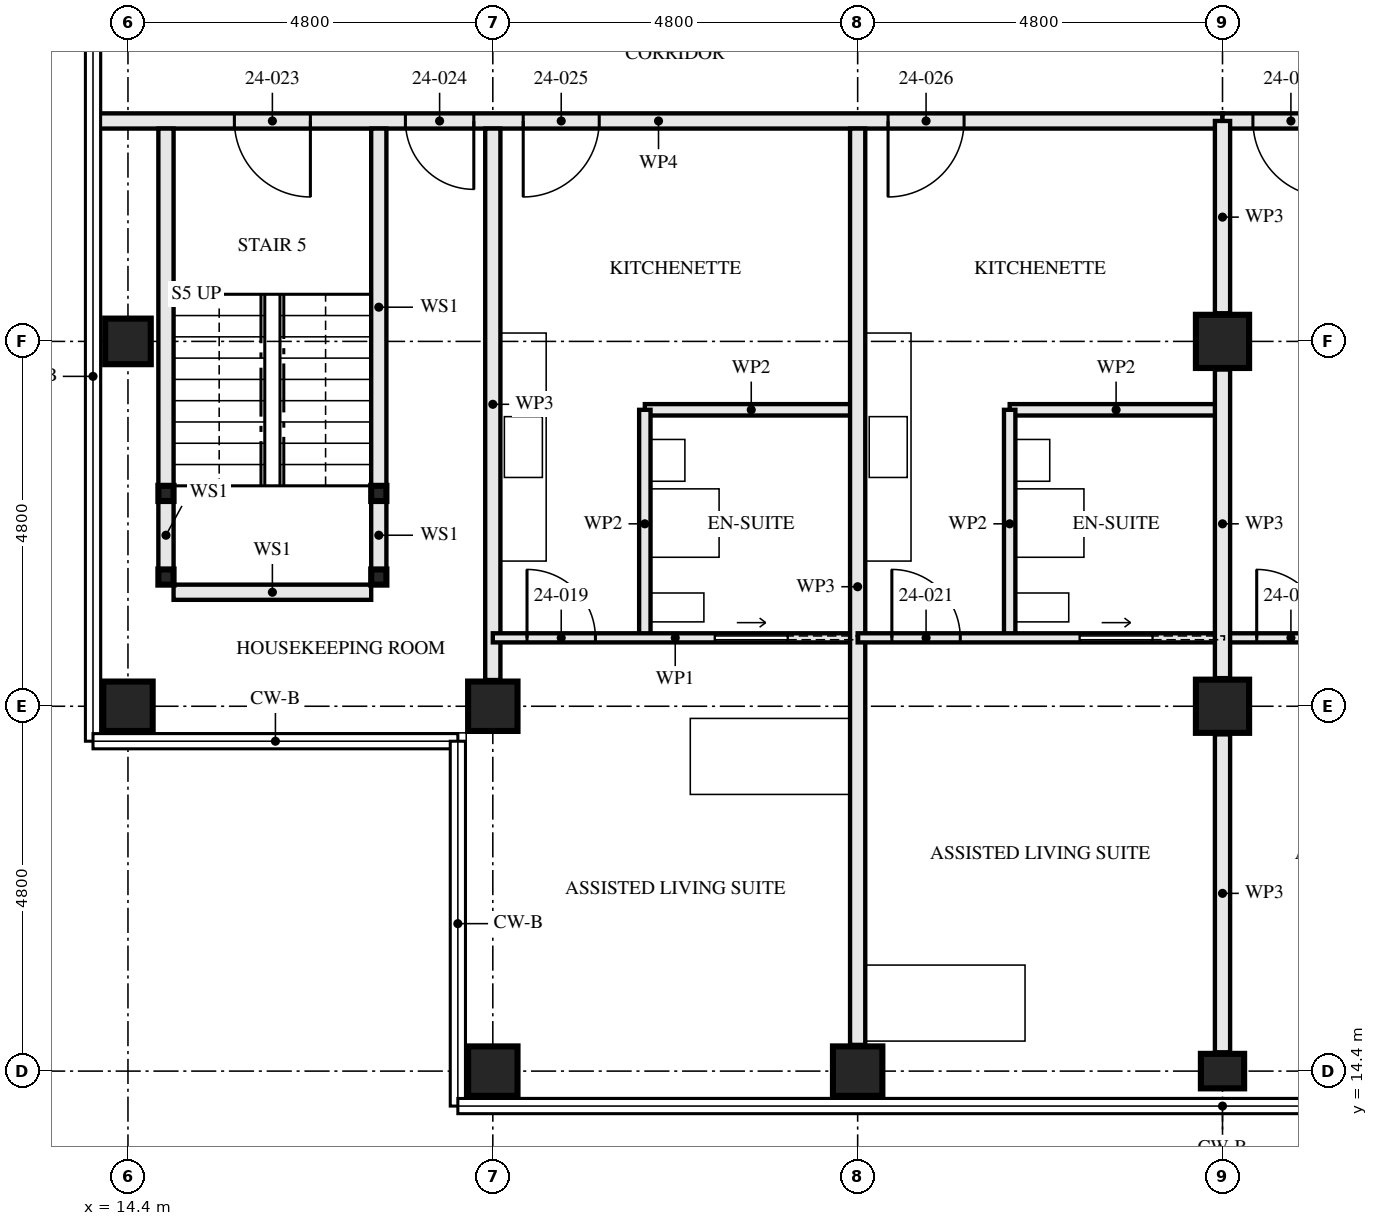
"""IFC4 building model, lengths in metres.
Left out: names, types, materials, properties, quantities, classifications, styles, units other than length and angle.
Written with IfcOpenShell. Run it as: python <this file> out.ifc"""

import sys

from ifc_helpers import new_model, si_unit, direction, frame, frame_2d, origin, origin_2d, place, context, subcontext, project, spatial, rectangle, hollow_rectangle, i_section, extrude, element, fill, save


model = new_model("IFC4")
c1 = context("Model", 3, precision=1e-05, world=origin(), true_north=direction((0.0, 1.0)))
c2 = subcontext(c1, "Body", "Model", "MODEL_VIEW")
j1 = project(units=[si_unit("LENGTHUNIT", "METRE"), si_unit("PLANEANGLEUNIT", "RADIAN")], contexts=[c1])
p1 = place(None, origin())
s1 = spatial("IfcSite", under=j1, at=p1, CompositionType="ELEMENT")
p2 = place(p1, origin())
s2 = spatial("IfcBuilding", under=s1, at=p2, CompositionType="ELEMENT")
p3 = place(p2, frame((0.0, 0.0, 91.0)))
s3 = spatial("IfcBuildingStorey", under=s2, at=p3, CompositionType="ELEMENT", Elevation=91.0)
p4 = place(p3, frame((14.4, 19.2, 0.0), z_axis=(0.0, 0.0, 1.0), x_axis=(0.0, 1.0, 0.0)))
e1 = element("IfcColumn", 1, at=p4, inside=s3, PredefinedType="COLUMN", context=c2, shape_type="SweptSolid", body=[
    extrude(hollow_rectangle(XDim=0.65, YDim=0.65, WallThickness=0.08, at=origin_2d()), origin(), (0.0, 0.0, 1.0), 3.5),
])
p5 = place(p3, frame((14.4, 24.0, 0.0), z_axis=(0.0, 0.0, 1.0), x_axis=(1.0, 0.0, 0.0)))
e2 = element("IfcColumn", 2, at=p5, inside=s3, PredefinedType="COLUMN", context=c2, shape_type="SweptSolid", body=[
    extrude(hollow_rectangle(XDim=0.6, YDim=0.6, WallThickness=0.08, at=origin_2d()), origin(), (0.0, 0.0, 1.0), 3.5),
])
for number, where, z_axis, x_axis in (
    (3, (19.2, 14.4, 0.0), (0.0, 0.0, 1.0), (0.0, 1.0, 0.0)),
    (4, (19.2, 19.2, 0.0), (0.0, 0.0, 1.0), (0.0, 1.0, 0.0)),
    (5, (24.0, 14.4, 0.0), (0.0, 0.0, 1.0), (0.0, 1.0, 0.0)),
):
    element("IfcColumn", number, at=place(p3, frame(where, z_axis=z_axis, x_axis=x_axis)), inside=s3, PredefinedType="COLUMN", context=c2, shape_type="SweptSolid", body=[
        extrude(hollow_rectangle(XDim=0.65, YDim=0.65, WallThickness=0.08, at=origin_2d()), origin(), (0.0, 0.0, 1.0), 3.5),
    ])
p6 = place(p3, frame((28.8, 14.4, 0.0), z_axis=(0.0, 0.0, 1.0), x_axis=(0.0, 1.0, 0.0)))
e6 = element("IfcColumn", 6, at=p6, inside=s3, PredefinedType="COLUMN", context=c2, shape_type="SweptSolid", body=[
    extrude(i_section(OverallWidth=0.454, OverallDepth=0.569, WebThickness=0.078, FlangeThickness=0.125, FilletRadius=0.015, at=origin_2d()), origin(), (0.0, 0.0, 1.0), 3.5),
])
for number, where, z_axis, x_axis in (
    (7, (28.8, 19.2, 0.0), (0.0, 0.0, 1.0), (1.0, 0.0, 0.0)),
    (8, (28.8, 24.0, 0.0), (0.0, 0.0, 1.0), (1.0, 0.0, 0.0)),
):
    element("IfcColumn", number, at=place(p3, frame(where, z_axis=z_axis, x_axis=x_axis)), inside=s3, PredefinedType="COLUMN", context=c2, shape_type="SweptSolid", body=[
        extrude(hollow_rectangle(XDim=0.7, YDim=0.7, WallThickness=0.06, at=origin_2d()), origin(), (0.0, 0.0, 1.0), 3.5),
    ])
for number, where, z_axis, x_axis in (
    (9, (14.9, 20.9, 0.0), (0.0, 0.0, 1.0), (1.0, 0.0, 0.0)),
    (10, (17.7, 20.9, 0.0), (0.0, 0.0, 1.0), (1.0, 0.0, 0.0)),
    (11, (14.9, 22.0, 0.0), (0.0, 0.0, 1.0), (1.0, 0.0, 0.0)),
    (12, (17.7, 22.0, 0.0), (0.0, 0.0, 1.0), (1.0, 0.0, 0.0)),
):
    element("IfcColumn", number, at=place(p3, frame(where, z_axis=z_axis, x_axis=x_axis)), inside=s3, PredefinedType="COLUMN", context=c2, shape_type="SweptSolid", body=[
        extrude(hollow_rectangle(XDim=0.2, YDim=0.2, WallThickness=0.008, at=origin_2d()), origin(), (0.0, 0.0, 1.0), 3.33),
    ])
p7 = place(p3, frame((14.9, 21.0, 0.0), z_axis=(0.0, 0.0, 1.0), x_axis=(0.0, 1.0, 0.0)))
e13 = element("IfcWall", 13, at=p7, inside=s3, PredefinedType="SOLIDWALL", context=c2, shape_type="SweptSolid", body=[
    extrude(rectangle(XDim=0.9, YDim=0.2, at=frame_2d((0.45, 0.0))), origin(), (0.0, 0.0, 1.0), 2.99),
])
p8 = place(p3, frame((14.9, 22.1, 0.0), z_axis=(0.0, 0.0, 1.0), x_axis=(0.0, 1.0, 0.0)))
e14 = element("IfcWall", 14, at=p8, inside=s3, PredefinedType="SOLIDWALL", context=c2, shape_type="SweptSolid", body=[
    extrude(rectangle(XDim=4.7, YDim=0.2, at=frame_2d((2.35, 0.0))), origin(), (0.0, 0.0, 1.0), 2.99),
])
p9 = place(p3, frame((17.7, 21.0, 0.0), z_axis=(0.0, 0.0, 1.0), x_axis=(0.0, 1.0, 0.0)))
e15 = element("IfcWall", 15, at=p9, inside=s3, PredefinedType="SOLIDWALL", context=c2, shape_type="SweptSolid", body=[
    extrude(rectangle(XDim=0.9, YDim=0.2, at=frame_2d((0.45, 0.0))), origin(), (0.0, 0.0, 1.0), 2.99),
])
p10 = place(p3, frame((17.7, 22.1, 0.0), z_axis=(0.0, 0.0, 1.0), x_axis=(0.0, 1.0, 0.0)))
e16 = element("IfcWall", 16, at=p10, inside=s3, PredefinedType="SOLIDWALL", context=c2, shape_type="SweptSolid", body=[
    extrude(rectangle(XDim=4.7, YDim=0.2, at=frame_2d((2.35, 0.0))), origin(), (0.0, 0.0, 1.0), 2.99),
])
p11 = place(p3, frame((15.0, 20.7, 0.0), z_axis=(0.0, 0.0, 1.0), x_axis=(1.0, 0.0, 0.0)))
e17 = element("IfcWall", 17, at=p11, inside=s3, PredefinedType="SOLIDWALL", context=c2, shape_type="SweptSolid", body=[
    extrude(rectangle(XDim=2.6, YDim=0.2, at=frame_2d((1.3, 0.0))), origin(), (0.0, 0.0, 1.0), 3.33),
])
p12 = place(p3, frame((19.2, 19.545, 0.0), z_axis=(0.0, 0.0, 1.0), x_axis=(0.0, 1.0, 0.0)))
e18 = element("IfcWall", 18, at=p12, inside=s3, PredefinedType="PARTITIONING", context=c2, shape_type="SweptSolid", body=[
    extrude(rectangle(XDim=7.255, YDim=0.2, at=frame_2d((3.627, 0.0))), origin(), (0.0, 0.0, 1.0), 2.55),
])
p13 = place(p3, frame((21.2, 20.1, 0.0), z_axis=(0.0, 0.0, 1.0), x_axis=(0.0, 1.0, 0.0)))
e19 = element("IfcWall", 19, at=p13, inside=s3, PredefinedType="PARTITIONING", context=c2, shape_type="SweptSolid", body=[
    extrude(rectangle(XDim=3.0, YDim=0.15, at=frame_2d((1.5, 0.0))), origin(), (0.0, 0.0, 1.0), 3.33),
])
p14 = place(p3, frame((21.2, 23.1, 0.0), z_axis=(0.0, 0.0, 1.0), x_axis=(1.0, 0.0, 0.0)))
e20 = element("IfcWall", 20, at=p14, inside=s3, PredefinedType="PARTITIONING", context=c2, shape_type="SweptSolid", body=[
    extrude(rectangle(XDim=2.8, YDim=0.15, at=frame_2d((1.4, 0.0))), origin(), (0.0, 0.0, 1.0), 3.33),
])
p15 = place(p3, frame((19.2, 20.1, 0.0), z_axis=(0.0, 0.0, 1.0), x_axis=(1.0, 0.0, 0.0)))
e21 = element("IfcWall", 21, at=p15, inside=s3, PredefinedType="PARTITIONING", context=c2, shape_type="SweptSolid", body=[
    extrude(rectangle(XDim=4.8, YDim=0.12, at=frame_2d((2.4, 0.0))), origin(), (0.0, 0.0, 1.0), 3.33),
])
p16 = place(p15, frame((0.45, 0.0, 0.0)))
e22 = element("IfcOpeningElement", 22, at=p16, cuts=e21, PredefinedType="OPENING", context=c2, shape_type="SweptSolid", body=[
    extrude(rectangle(XDim=0.9, YDim=2.1, at=frame_2d((0.45, 1.05))), frame((0.0, 0.071, 0.0), z_axis=(0.0, -1.0, 0.0), x_axis=(1.0, 0.0, 0.0)), (0.0, 0.0, 1.0), 0.141),
])
p17 = place(p15, frame((2.925, 0.0, 0.0)))
e23 = element("IfcOpeningElement", 23, at=p17, cuts=e21, PredefinedType="OPENING", context=c2, shape_type="SweptSolid", body=[
    extrude(rectangle(XDim=0.95, YDim=2.1, at=frame_2d((0.475, 1.05))), frame((0.0, 0.071, 0.0), z_axis=(0.0, -1.0, 0.0), x_axis=(1.0, 0.0, 0.0)), (0.0, 0.0, 1.0), 0.141),
])
p18 = place(p3, frame((24.0, 14.745, 0.0), z_axis=(0.0, 0.0, 1.0), x_axis=(0.0, 1.0, 0.0)))
e24 = element("IfcWall", 24, at=p18, inside=s3, PredefinedType="PARTITIONING", context=c2, shape_type="SweptSolid", body=[
    extrude(rectangle(XDim=12.055, YDim=0.2, at=frame_2d((6.027, 0.0))), origin(), (0.0, 0.0, 1.0), 2.55),
])
p19 = place(p3, frame((26.0, 20.1, 0.0), z_axis=(0.0, 0.0, 1.0), x_axis=(0.0, 1.0, 0.0)))
e25 = element("IfcWall", 25, at=p19, inside=s3, PredefinedType="PARTITIONING", context=c2, shape_type="SweptSolid", body=[
    extrude(rectangle(XDim=3.0, YDim=0.15, at=frame_2d((1.5, 0.0))), origin(), (0.0, 0.0, 1.0), 3.33),
])
p20 = place(p3, frame((26.0, 23.1, 0.0), z_axis=(0.0, 0.0, 1.0), x_axis=(1.0, 0.0, 0.0)))
e26 = element("IfcWall", 26, at=p20, inside=s3, PredefinedType="PARTITIONING", context=c2, shape_type="SweptSolid", body=[
    extrude(rectangle(XDim=2.8, YDim=0.15, at=frame_2d((1.4, 0.0))), origin(), (0.0, 0.0, 1.0), 3.33),
])
p21 = place(p3, frame((24.0, 20.1, 0.0), z_axis=(0.0, 0.0, 1.0), x_axis=(1.0, 0.0, 0.0)))
e27 = element("IfcWall", 27, at=p21, inside=s3, PredefinedType="PARTITIONING", context=c2, shape_type="SweptSolid", body=[
    extrude(rectangle(XDim=4.8, YDim=0.12, at=frame_2d((2.4, 0.0))), origin(), (0.0, 0.0, 1.0), 3.33),
])
p22 = place(p21, frame((0.45, 0.0, 0.0)))
e28 = element("IfcOpeningElement", 28, at=p22, cuts=e27, PredefinedType="OPENING", context=c2, shape_type="SweptSolid", body=[
    extrude(rectangle(XDim=0.9, YDim=2.1, at=frame_2d((0.45, 1.05))), frame((0.0, 0.071, 0.0), z_axis=(0.0, -1.0, 0.0), x_axis=(1.0, 0.0, 0.0)), (0.0, 0.0, 1.0), 0.141),
])
p23 = place(p21, frame((2.925, 0.0, 0.0)))
e29 = element("IfcOpeningElement", 29, at=p23, cuts=e27, PredefinedType="OPENING", context=c2, shape_type="SweptSolid", body=[
    extrude(rectangle(XDim=0.95, YDim=2.1, at=frame_2d((0.475, 1.05))), frame((0.0, 0.071, 0.0), z_axis=(0.0, -1.0, 0.0), x_axis=(1.0, 0.0, 0.0)), (0.0, 0.0, 1.0), 0.141),
])
p24 = place(p3, frame((13.96, 26.9, 0.0), z_axis=(0.0, 0.0, 1.0), x_axis=(1.0, 0.0, 0.0)))
e30 = element("IfcWall", 30, at=p24, inside=s3, PredefinedType="PARTITIONING", context=c2, shape_type="SweptSolid", body=[
    extrude(rectangle(XDim=14.84, YDim=0.2, at=frame_2d((7.42, 0.0))), origin(), (0.0, 0.0, 1.0), 2.32),
])
p25 = place(p24, frame((1.84, 0.0, 0.0)))
e31 = element("IfcOpeningElement", 31, at=p25, cuts=e30, PredefinedType="OPENING", context=c2, shape_type="SweptSolid", body=[
    extrude(rectangle(XDim=1.0, YDim=2.1, at=frame_2d((0.5, 1.05))), frame((0.0, 0.111, 0.0), z_axis=(0.0, -1.0, 0.0), x_axis=(1.0, 0.0, 0.0)), (0.0, 0.0, 1.0), 0.221),
])
p26 = place(p24, frame((4.09, 0.0, 0.0)))
e32 = element("IfcOpeningElement", 32, at=p26, cuts=e30, PredefinedType="OPENING", context=c2, shape_type="SweptSolid", body=[
    extrude(rectangle(XDim=0.9, YDim=2.1, at=frame_2d((0.45, 1.05))), frame((0.0, 0.111, 0.0), z_axis=(0.0, -1.0, 0.0), x_axis=(1.0, 0.0, 0.0)), (0.0, 0.0, 1.0), 0.221),
])
p27 = place(p24, frame((5.64, 0.0, 0.0)))
e33 = element("IfcOpeningElement", 33, at=p27, cuts=e30, PredefinedType="OPENING", context=c2, shape_type="SweptSolid", body=[
    extrude(rectangle(XDim=1.0, YDim=2.1, at=frame_2d((0.5, 1.05))), frame((0.0, 0.111, 0.0), z_axis=(0.0, -1.0, 0.0), x_axis=(1.0, 0.0, 0.0)), (0.0, 0.0, 1.0), 0.221),
])
p28 = place(p24, frame((10.44, 0.0, 0.0)))
e34 = element("IfcOpeningElement", 34, at=p28, cuts=e30, PredefinedType="OPENING", context=c2, shape_type="SweptSolid", body=[
    extrude(rectangle(XDim=1.0, YDim=2.1, at=frame_2d((0.5, 1.05))), frame((0.0, 0.111, 0.0), z_axis=(0.0, -1.0, 0.0), x_axis=(1.0, 0.0, 0.0)), (0.0, 0.0, 1.0), 0.221),
])
p29 = place(p3, frame((28.8, 20.1, 0.0), z_axis=(0.0, 0.0, 1.0), x_axis=(1.0, 0.0, 0.0)))
e35 = element("IfcWall", 35, at=p29, inside=s3, PredefinedType="PARTITIONING", context=c2, shape_type="SweptSolid", body=[
    extrude(rectangle(XDim=4.8, YDim=0.12, at=frame_2d((2.4, 0.0))), origin(), (0.0, 0.0, 1.0), 3.33),
])
p30 = place(p29, frame((0.45, 0.0, 0.0)))
e36 = element("IfcOpeningElement", 36, at=p30, cuts=e35, PredefinedType="OPENING", context=c2, shape_type="SweptSolid", body=[
    extrude(rectangle(XDim=0.9, YDim=2.1, at=frame_2d((0.45, 1.05))), frame((0.0, 0.071, 0.0), z_axis=(0.0, -1.0, 0.0), x_axis=(1.0, 0.0, 0.0)), (0.0, 0.0, 1.0), 0.141),
])
p31 = place(p29, frame((2.925, 0.0, 0.0)))
e37 = element("IfcOpeningElement", 37, at=p31, cuts=e35, PredefinedType="OPENING", context=c2, shape_type="SweptSolid", body=[
    extrude(rectangle(XDim=0.95, YDim=2.1, at=frame_2d((0.475, 1.05))), frame((0.0, 0.071, 0.0), z_axis=(0.0, -1.0, 0.0), x_axis=(1.0, 0.0, 0.0)), (0.0, 0.0, 1.0), 0.141),
])
p32 = place(p3, frame((28.8, 26.9, 0.0), z_axis=(0.0, 0.0, 1.0), x_axis=(1.0, 0.0, 0.0)))
e38 = element("IfcWall", 38, at=p32, inside=s3, PredefinedType="PARTITIONING", context=c2, shape_type="SweptSolid", body=[
    extrude(rectangle(XDim=9.6, YDim=0.2, at=frame_2d((4.8, 0.0))), origin(), (0.0, 0.0, 1.0), 3.33),
])
p33 = place(p32, frame((0.4, 0.0, 0.0)))
e39 = element("IfcOpeningElement", 39, at=p33, cuts=e38, PredefinedType="OPENING", context=c2, shape_type="SweptSolid", body=[
    extrude(rectangle(XDim=1.0, YDim=2.1, at=frame_2d((0.5, 1.05))), frame((0.0, 0.111, 0.0), z_axis=(0.0, -1.0, 0.0), x_axis=(1.0, 0.0, 0.0)), (0.0, 0.0, 1.0), 0.221),
])
p34 = place(p32, frame((5.2, 0.0, 0.0)))
e40 = element("IfcOpeningElement", 40, at=p34, cuts=e38, PredefinedType="OPENING", context=c2, shape_type="SweptSolid", body=[
    extrude(rectangle(XDim=1.0, YDim=2.1, at=frame_2d((0.5, 1.05))), frame((0.0, 0.111, 0.0), z_axis=(0.0, -1.0, 0.0), x_axis=(1.0, 0.0, 0.0)), (0.0, 0.0, 1.0), 0.221),
])
p35 = place(p3, frame((28.8, 14.647, 0.0), z_axis=(0.0, 0.0, 1.0), x_axis=(0.0, 1.0, 0.0)))
e41 = element("IfcWall", 41, at=p35, inside=s3, PredefinedType="PARTITIONING", context=c2, shape_type="SweptSolid", body=[
    extrude(rectangle(XDim=4.183, YDim=0.2, at=frame_2d((2.092, 0.0))), origin(), (0.0, 0.0, 1.0), 2.32),
])
p36 = place(p3, frame((28.8, 19.57, 0.0), z_axis=(0.0, 0.0, 1.0), x_axis=(0.0, 1.0, 0.0)))
e42 = element("IfcWall", 42, at=p36, inside=s3, PredefinedType="PARTITIONING", context=c2, shape_type="SweptSolid", body=[
    extrude(rectangle(XDim=4.06, YDim=0.2, at=frame_2d((2.03, 0.0))), origin(), (0.0, 0.0, 1.0), 2.32),
])
p37 = place(p3, frame((28.8, 24.37, 0.0), z_axis=(0.0, 0.0, 1.0), x_axis=(0.0, 1.0, 0.0)))
e43 = element("IfcWall", 43, at=p37, inside=s3, PredefinedType="PARTITIONING", context=c2, shape_type="SweptSolid", body=[
    extrude(rectangle(XDim=2.53, YDim=0.2, at=frame_2d((1.265, 0.0))), origin(), (0.0, 0.0, 1.0), 2.32),
])
p38 = place(p16, origin())
e44 = element("IfcDoor", 44, at=p38, inside=s3, OperationType="SINGLE_SWING_RIGHT", PredefinedType="DOOR", context=c2, shape_type="SweptSolid", body=[
    extrude(rectangle(XDim=0.9, YDim=2.1, at=frame_2d((0.45, 1.05))), frame((0.0, 0.022, 0.0), z_axis=(0.0, -1.0, 0.0), x_axis=(1.0, 0.0, 0.0)), (0.0, 0.0, 1.0), 0.044),
])
fill(e22, e44)
p39 = place(p17, origin())
e45 = element("IfcDoor", 45, at=p39, inside=s3, OperationType="SLIDING_TO_LEFT", PredefinedType="DOOR", context=c2, shape_type="SweptSolid", body=[
    extrude(rectangle(XDim=0.95, YDim=2.1, at=frame_2d((0.475, 1.05))), frame((0.0, 0.022, 0.0), z_axis=(0.0, -1.0, 0.0), x_axis=(1.0, 0.0, 0.0)), (0.0, 0.0, 1.0), 0.044),
])
fill(e23, e45)
p40 = place(p22, origin())
e46 = element("IfcDoor", 46, at=p40, inside=s3, OperationType="SINGLE_SWING_RIGHT", PredefinedType="DOOR", context=c2, shape_type="SweptSolid", body=[
    extrude(rectangle(XDim=0.9, YDim=2.1, at=frame_2d((0.45, 1.05))), frame((0.0, 0.022, 0.0), z_axis=(0.0, -1.0, 0.0), x_axis=(1.0, 0.0, 0.0)), (0.0, 0.0, 1.0), 0.044),
])
fill(e28, e46)
p41 = place(p23, origin())
e47 = element("IfcDoor", 47, at=p41, inside=s3, OperationType="SLIDING_TO_LEFT", PredefinedType="DOOR", context=c2, shape_type="SweptSolid", body=[
    extrude(rectangle(XDim=0.95, YDim=2.1, at=frame_2d((0.475, 1.05))), frame((0.0, 0.022, 0.0), z_axis=(0.0, -1.0, 0.0), x_axis=(1.0, 0.0, 0.0)), (0.0, 0.0, 1.0), 0.044),
])
fill(e29, e47)
p42 = place(p25, frame((1.0, 0.0, 0.0), z_axis=(0.0, 0.0, 1.0), x_axis=(-1.0, 0.0, 0.0)))
e48 = element("IfcDoor", 48, at=p42, inside=s3, OperationType="SINGLE_SWING_RIGHT", PredefinedType="DOOR", context=c2, shape_type="SweptSolid", body=[
    extrude(rectangle(XDim=1.0, YDim=2.1, at=frame_2d((0.5, 1.05))), frame((0.0, 0.032, 0.0), z_axis=(0.0, -1.0, 0.0), x_axis=(1.0, 0.0, 0.0)), (0.0, 0.0, 1.0), 0.064),
])
fill(e31, e48)
p43 = place(p26, frame((0.9, 0.0, 0.0), z_axis=(0.0, 0.0, 1.0), x_axis=(-1.0, 0.0, 0.0)))
e49 = element("IfcDoor", 49, at=p43, inside=s3, OperationType="SINGLE_SWING_RIGHT", PredefinedType="DOOR", context=c2, shape_type="SweptSolid", body=[
    extrude(rectangle(XDim=0.9, YDim=2.1, at=frame_2d((0.45, 1.05))), frame((0.0, 0.027, 0.0), z_axis=(0.0, -1.0, 0.0), x_axis=(1.0, 0.0, 0.0)), (0.0, 0.0, 1.0), 0.054),
])
fill(e32, e49)
p44 = place(p27, frame((1.0, 0.0, 0.0), z_axis=(0.0, 0.0, 1.0), x_axis=(-1.0, 0.0, 0.0)))
e50 = element("IfcDoor", 50, at=p44, inside=s3, OperationType="SINGLE_SWING_LEFT", PredefinedType="DOOR", context=c2, shape_type="SweptSolid", body=[
    extrude(rectangle(XDim=1.0, YDim=2.1, at=frame_2d((0.5, 1.05))), frame((0.0, 0.027, 0.0), z_axis=(0.0, -1.0, 0.0), x_axis=(1.0, 0.0, 0.0)), (0.0, 0.0, 1.0), 0.054),
])
fill(e33, e50)
p45 = place(p28, frame((1.0, 0.0, 0.0), z_axis=(0.0, 0.0, 1.0), x_axis=(-1.0, 0.0, 0.0)))
e51 = element("IfcDoor", 51, at=p45, inside=s3, OperationType="SINGLE_SWING_LEFT", PredefinedType="DOOR", context=c2, shape_type="SweptSolid", body=[
    extrude(rectangle(XDim=1.0, YDim=2.1, at=frame_2d((0.5, 1.05))), frame((0.0, 0.027, 0.0), z_axis=(0.0, -1.0, 0.0), x_axis=(1.0, 0.0, 0.0)), (0.0, 0.0, 1.0), 0.054),
])
fill(e34, e51)
p46 = place(p30, origin())
e52 = element("IfcDoor", 52, at=p46, inside=s3, OperationType="SINGLE_SWING_RIGHT", PredefinedType="DOOR", context=c2, shape_type="SweptSolid", body=[
    extrude(rectangle(XDim=0.9, YDim=2.1, at=frame_2d((0.45, 1.05))), frame((0.0, 0.022, 0.0), z_axis=(0.0, -1.0, 0.0), x_axis=(1.0, 0.0, 0.0)), (0.0, 0.0, 1.0), 0.044),
])
fill(e36, e52)
p47 = place(p33, frame((1.0, 0.0, 0.0), z_axis=(0.0, 0.0, 1.0), x_axis=(-1.0, 0.0, 0.0)))
e53 = element("IfcDoor", 53, at=p47, inside=s3, OperationType="SINGLE_SWING_RIGHT", PredefinedType="DOOR", context=c2, shape_type="SweptSolid", body=[
    extrude(rectangle(XDim=1.0, YDim=2.1, at=frame_2d((0.5, 1.05))), frame((0.0, 0.027, 0.0), z_axis=(0.0, -1.0, 0.0), x_axis=(1.0, 0.0, 0.0)), (0.0, 0.0, 1.0), 0.054),
])
fill(e39, e53)
save(model, sys.argv[1])
